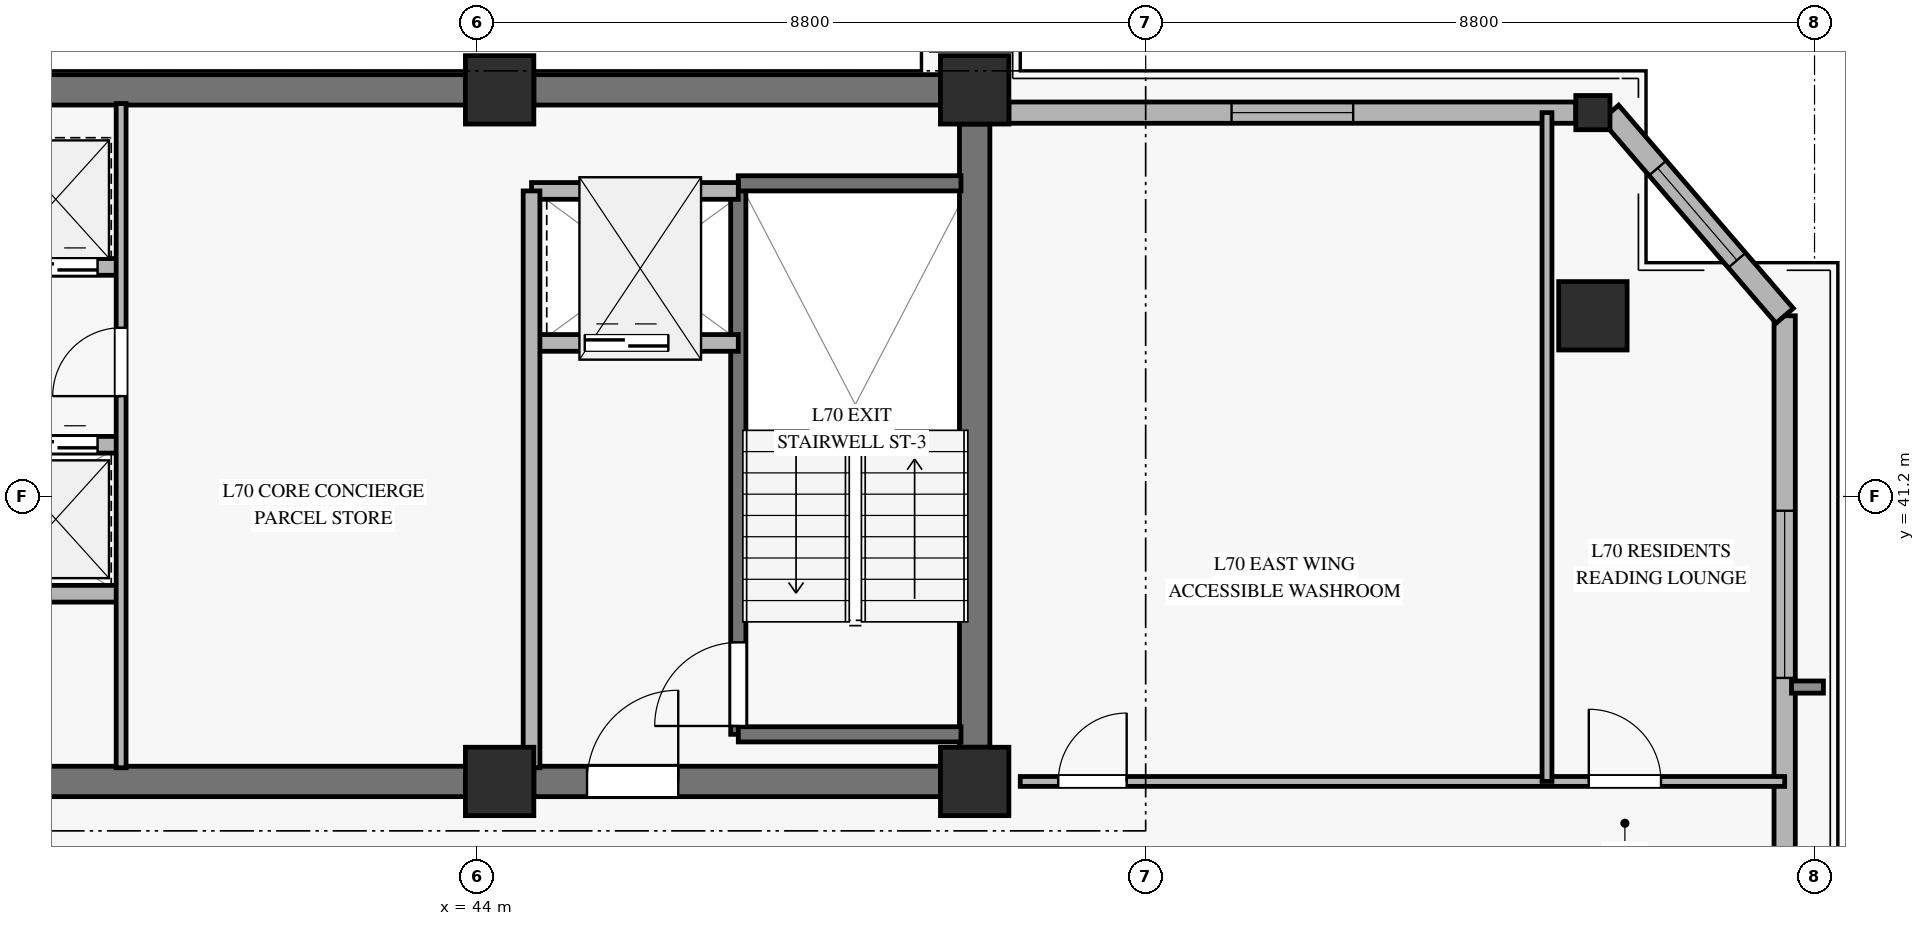
"""IFC4 building model, lengths in metres.
Left out: names, types, materials, properties, quantities, classifications, styles, units other than length and angle.
Written with IfcOpenShell. Run it as: python <this file> out.ifc"""

import sys

from ifc_helpers import new_model, si_unit, direction, frame, frame_2d, origin, origin_2d, place, context, subcontext, project, spatial, rectangle, hollow_rectangle, extrude, source, transform, mapped, element, fill, save


model = new_model("IFC4")
c1 = context("Model", 3, precision=1e-05, world=origin(), true_north=direction((0.0, 1.0)))
c2 = subcontext(c1, "Body", "Model", "MODEL_VIEW")
j1 = project(units=[si_unit("LENGTHUNIT", "METRE"), si_unit("PLANEANGLEUNIT", "RADIAN")], contexts=[c1])
p1 = place(None, origin())
s1 = spatial("IfcSite", under=j1, at=p1, CompositionType="ELEMENT")
p2 = place(p1, origin())
s2 = spatial("IfcBuilding", under=s1, at=p2, CompositionType="ELEMENT")
p3 = place(p2, frame((0.0, 0.0, 272.3)))
s3 = spatial("IfcBuildingStorey", under=s2, at=p3, CompositionType="ELEMENT", Elevation=272.3)
m1 = source(origin(), c2, "Body", "SweptSolid", [
    extrude(rectangle(XDim=0.9, YDim=0.9, at=origin_2d()), origin(), (0.0, 0.0, 1.0), 3.185),
])
for number, where, z_axis, x_axis in (
    (1, (44.3, 37.45, 0.0), (0.0, 0.0, 1.0), (1.0, 0.0, 0.0)),
    (2, (44.3, 46.55, 0.0), (0.0, 0.0, 1.0), (1.0, 0.0, 0.0)),
    (3, (50.55, 37.45, 0.0), (0.0, 0.0, 1.0), (1.0, 0.0, 0.0)),
    (4, (50.55, 46.55, 0.0), (0.0, 0.0, 1.0), (1.0, 0.0, 0.0)),
):
    element("IfcColumn", number, at=place(p3, frame(where, z_axis=z_axis, x_axis=x_axis)), inside=s3, PredefinedType="PILASTER", context=c2, shape_type="MappedRepresentation", body=[
        mapped(m1, transform((0.0, 0.0, 0.0), x_axis=(1.0, 0.0, 0.0), y_axis=(0.0, 1.0, 0.0), z_axis=(0.0, 0.0, 1.0), scale=1.0)),
    ])
p4 = place(p3, frame((36.05, 46.55, 0.0), z_axis=(0.0, 0.0, 1.0), x_axis=(1.0, 0.0, 0.0)))
e5 = element("IfcWall", 5, at=p4, inside=s3, PredefinedType="SHEAR", context=c2, shape_type="SweptSolid", body=[
    extrude(rectangle(XDim=7.8, YDim=0.4, at=frame_2d((3.9, 0.0))), origin(), (0.0, 0.0, 1.0), 3.185),
])
p5 = place(p3, frame((44.75, 46.55, 0.0), z_axis=(0.0, 0.0, 1.0), x_axis=(1.0, 0.0, 0.0)))
e6 = element("IfcWall", 6, at=p5, inside=s3, PredefinedType="SHEAR", context=c2, shape_type="SweptSolid", body=[
    extrude(rectangle(XDim=5.35, YDim=0.4, at=frame_2d((2.675, 0.0))), origin(), (0.0, 0.0, 1.0), 3.185),
])
p6 = place(p3, frame((36.05, 37.45, 0.0), z_axis=(0.0, 0.0, 1.0), x_axis=(1.0, 0.0, 0.0)))
e7 = element("IfcWall", 7, at=p6, inside=s3, PredefinedType="SHEAR", context=c2, shape_type="SweptSolid", body=[
    extrude(rectangle(XDim=7.8, YDim=0.4, at=frame_2d((3.9, 0.0))), origin(), (0.0, 0.0, 1.0), 3.185),
])
p7 = place(p3, frame((44.75, 37.45, 0.0), z_axis=(0.0, 0.0, 1.0), x_axis=(1.0, 0.0, 0.0)))
e8 = element("IfcWall", 8, at=p7, inside=s3, PredefinedType="SHEAR", context=c2, shape_type="SweptSolid", body=[
    extrude(rectangle(XDim=5.35, YDim=0.4, at=frame_2d((2.675, 0.0))), origin(), (0.0, 0.0, 1.0), 3.185),
])
p8 = place(p7, frame((0.7, 0.0, 0.0)))
e9 = element("IfcOpeningElement", 9, at=p8, cuts=e8, PredefinedType="OPENING", context=c2, shape_type="SweptSolid", body=[
    extrude(rectangle(XDim=1.2, YDim=2.15, at=frame_2d((0.6, 1.075))), frame((0.0, 0.21, 0.0), z_axis=(0.0, -1.0, 0.0), x_axis=(1.0, 0.0, 0.0)), (0.0, 0.0, 1.0), 0.42),
])
p9 = place(p3, frame((50.55, 37.9, 0.0), z_axis=(0.0, 0.0, 1.0), x_axis=(0.0, 1.0, 0.0)))
e10 = element("IfcWall", 10, at=p9, inside=s3, PredefinedType="SHEAR", context=c2, shape_type="SweptSolid", body=[
    extrude(rectangle(XDim=8.2, YDim=0.4, at=frame_2d((4.1, 0.0))), origin(), (0.0, 0.0, 1.0), 3.185),
])
m2 = source(origin(), c2, "Body", "SweptSolid", [
    extrude(hollow_rectangle(XDim=0.9, YDim=0.9, WallThickness=0.04, at=origin_2d()), origin(), (0.0, 0.0, 1.0), 3.185),
])
p10 = place(p3, frame((58.684, 43.577, 0.0), z_axis=(0.0, 0.0, 1.0), x_axis=(1.0, 0.0, 0.0)))
e11 = element("IfcColumn", 11, at=p10, inside=s3, PredefinedType="COLUMN", context=c2, shape_type="MappedRepresentation", body=[
    mapped(m2, transform((0.0, 0.0, 0.0), x_axis=(1.0, 0.0, 0.0), y_axis=(0.0, 1.0, 0.0), z_axis=(0.0, 0.0, 1.0), scale=1.0)),
])
m3 = source(origin(), c2, "Body", "SweptSolid", [
    extrude(hollow_rectangle(XDim=0.45, YDim=0.45, WallThickness=0.022, at=origin_2d()), origin(), (0.0, 0.0, 1.0), 3.185),
])
p11 = place(p3, frame((58.684, 46.25, 0.0), z_axis=(0.0, 0.0, 1.0), x_axis=(1.0, 0.0, 0.0)))
e12 = element("IfcColumn", 12, at=p11, inside=s3, PredefinedType="COLUMN", context=c2, shape_type="MappedRepresentation", body=[
    mapped(m3, transform((0.0, 0.0, 0.0), x_axis=(1.0, 0.0, 0.0), y_axis=(0.0, 1.0, 0.0), z_axis=(0.0, 0.0, 1.0), scale=1.0)),
])
p12 = place(p3, frame((61.207, 31.763, 0.0), z_axis=(0.0, 0.0, 1.0), x_axis=(0.0, 1.0, 0.0)))
e13 = element("IfcWall", 13, at=p12, inside=s3, PredefinedType="SOLIDWALL", context=c2, shape_type="SweptSolid", body=[
    extrude(rectangle(XDim=11.814, YDim=0.28, at=frame_2d((5.907, 0.0))), origin(), (0.0, 0.0, 1.0), 2.815),
])
p13 = place(p12, frame((7.049, 0.0, 0.45)))
e14 = element("IfcOpeningElement", 14, at=p13, cuts=e13, PredefinedType="OPENING", context=c2, shape_type="SweptSolid", body=[
    extrude(rectangle(XDim=2.2, YDim=2.1, at=frame_2d((1.1, 1.05))), frame((0.0, 0.15, 0.0), z_axis=(0.0, -1.0, 0.0), x_axis=(1.0, 0.0, 0.0)), (0.0, 0.0, 1.0), 0.3),
])
p14 = place(p3, frame((51.0, 46.25, 0.0), z_axis=(0.0, 0.0, 1.0), x_axis=(1.0, 0.0, 0.0)))
e15 = element("IfcWall", 15, at=p14, inside=s3, PredefinedType="SOLIDWALL", context=c2, shape_type="SweptSolid", body=[
    extrude(rectangle(XDim=7.459, YDim=0.28, at=frame_2d((3.729, 0.0))), origin(), (0.0, 0.0, 1.0), 2.815),
])
p15 = place(p14, frame((2.93, 0.0, 0.45)))
e16 = element("IfcOpeningElement", 16, at=p15, cuts=e15, PredefinedType="OPENING", context=c2, shape_type="SweptSolid", body=[
    extrude(rectangle(XDim=1.6, YDim=2.0, at=frame_2d((0.8, 1.0))), frame((0.0, 0.15, 0.0), z_axis=(0.0, -1.0, 0.0), x_axis=(1.0, 0.0, 0.0)), (0.0, 0.0, 1.0), 0.3),
])
p16 = place(p3, frame((61.207, 43.577, 0.0), z_axis=(0.0, 0.0, 1.0), x_axis=(-0.651914250567, 0.758292694089, 0.0)))
e17 = element("IfcWall", 17, at=p16, inside=s3, PredefinedType="SOLIDWALL", context=c2, shape_type="SweptSolid", body=[
    extrude(rectangle(XDim=3.525, YDim=0.3, at=frame_2d((1.763, 0.0))), origin(), (0.0, 0.0, 1.0), 2.815),
])
p17 = place(p16, frame((0.963, 0.0, 0.45)))
e18 = element("IfcOpeningElement", 18, at=p17, cuts=e17, PredefinedType="OPENING", context=c2, shape_type="SweptSolid", body=[
    extrude(rectangle(XDim=1.6, YDim=2.0, at=frame_2d((0.8, 1.0))), frame((0.0, 0.16, 0.0), z_axis=(0.0, -1.0, 0.0), x_axis=(1.0, 0.0, 0.0)), (0.0, 0.0, 1.0), 0.32),
])
p18 = place(p3, frame((47.44, 38.07, 0.0), z_axis=(0.0, 0.0, 1.0), x_axis=(0.0, 1.0, 0.0)))
e19 = element("IfcWall", 19, at=p18, inside=s3, PredefinedType="SOLIDWALL", context=c2, shape_type="SweptSolid", body=[
    extrude(rectangle(XDim=7.25, YDim=0.2, at=frame_2d((3.625, 0.0))), origin(), (0.0, 0.0, 1.0), 3.4),
])
p19 = place(p18, frame((0.11, 0.0, 0.0)))
e20 = element("IfcOpeningElement", 20, at=p19, cuts=e19, PredefinedType="OPENING", context=c2, shape_type="SweptSolid", body=[
    extrude(rectangle(XDim=1.1, YDim=2.15, at=frame_2d((0.55, 1.075))), frame((0.0, 0.11, 0.0), z_axis=(0.0, -1.0, 0.0), x_axis=(1.0, 0.0, 0.0)), (0.0, 0.0, 1.0), 0.22),
])
for number, where, z_axis, x_axis in (
    (21, (47.44, 45.32, 0.0), (0.0, 0.0, 1.0), (1.0, 0.0, 0.0)),
    (22, (47.44, 38.07, 0.0), (0.0, 0.0, 1.0), (1.0, 0.0, 0.0)),
):
    element("IfcWall", number, at=place(p3, frame(where, z_axis=z_axis, x_axis=x_axis)), inside=s3, PredefinedType="SOLIDWALL", context=c2, shape_type="SweptSolid", body=[
        extrude(rectangle(XDim=2.93, YDim=0.2, at=frame_2d((1.465, 0.0))), origin(), (0.0, 0.0, 1.0), 3.4),
    ])
p20 = place(p3, frame((44.72, 43.22, 0.0), z_axis=(0.0, 0.0, 1.0), x_axis=(1.0, 0.0, 0.0)))
e23 = element("IfcWall", 23, at=p20, inside=s3, PredefinedType="SOLIDWALL", context=c2, shape_type="SweptSolid", body=[
    extrude(rectangle(XDim=2.72, YDim=0.22, at=frame_2d((1.36, 0.0))), origin(), (0.0, 0.0, 1.0), 3.185),
])
p21 = place(p20, frame((0.7, 0.0, 0.0)))
e24 = element("IfcOpeningElement", 24, at=p21, cuts=e23, PredefinedType="OPENING", context=c2, shape_type="SweptSolid", body=[
    extrude(rectangle(XDim=1.1, YDim=2.2, at=frame_2d((0.55, 1.1))), frame((0.0, 0.12, 0.0), z_axis=(0.0, -1.0, 0.0), x_axis=(1.0, 0.0, 0.0)), (0.0, 0.0, 1.0), 0.24),
])
p22 = place(p3, frame((44.72, 45.22, 0.0), z_axis=(0.0, 0.0, 1.0), x_axis=(1.0, 0.0, 0.0)))
e25 = element("IfcWall", 25, at=p22, inside=s3, PredefinedType="SOLIDWALL", context=c2, shape_type="SweptSolid", body=[
    extrude(rectangle(XDim=2.72, YDim=0.22, at=frame_2d((1.36, 0.0))), origin(), (0.0, 0.0, 1.0), 3.185),
])
p23 = place(p3, frame((44.72, 37.63, 0.0), z_axis=(0.0, 0.0, 1.0), x_axis=(0.0, 1.0, 0.0)))
e26 = element("IfcWall", 26, at=p23, inside=s3, PredefinedType="SOLIDWALL", context=c2, shape_type="SweptSolid", body=[
    extrude(rectangle(XDim=7.59, YDim=0.22, at=frame_2d((3.795, 0.0))), origin(), (0.0, 0.0, 1.0), 3.185),
])
p24 = place(p3, frame((36.12, 44.22, 0.0), z_axis=(0.0, 0.0, 1.0), x_axis=(1.0, 0.0, 0.0)))
e27 = element("IfcWall", 27, at=p24, inside=s3, PredefinedType="SOLIDWALL", context=c2, shape_type="SweptSolid", body=[
    extrude(rectangle(XDim=3.2, YDim=0.22, at=frame_2d((1.6, 0.0))), origin(), (0.0, 0.0, 1.0), 3.185),
])
p25 = place(p24, frame((0.3, 0.0, 0.0)))
e28 = element("IfcOpeningElement", 28, at=p25, cuts=e27, PredefinedType="OPENING", context=c2, shape_type="SweptSolid", body=[
    extrude(rectangle(XDim=1.1, YDim=2.2, at=frame_2d((0.55, 1.1))), frame((0.0, 0.12, 0.0), z_axis=(0.0, -1.0, 0.0), x_axis=(1.0, 0.0, 0.0)), (0.0, 0.0, 1.0), 0.24),
])
p26 = place(p24, frame((1.79, 0.0, 0.0)))
e29 = element("IfcOpeningElement", 29, at=p26, cuts=e27, PredefinedType="OPENING", context=c2, shape_type="SweptSolid", body=[
    extrude(rectangle(XDim=1.1, YDim=2.2, at=frame_2d((0.55, 1.1))), frame((0.0, 0.12, 0.0), z_axis=(0.0, -1.0, 0.0), x_axis=(1.0, 0.0, 0.0)), (0.0, 0.0, 1.0), 0.24),
])
p27 = place(p3, frame((36.12, 41.88, 0.0), z_axis=(0.0, 0.0, 1.0), x_axis=(1.0, 0.0, 0.0)))
e30 = element("IfcWall", 30, at=p27, inside=s3, PredefinedType="SOLIDWALL", context=c2, shape_type="SweptSolid", body=[
    extrude(rectangle(XDim=3.2, YDim=0.22, at=frame_2d((1.6, 0.0))), origin(), (0.0, 0.0, 1.0), 3.185),
])
p28 = place(p27, frame((0.3, 0.0, 0.0)))
e31 = element("IfcOpeningElement", 31, at=p28, cuts=e30, PredefinedType="OPENING", context=c2, shape_type="SweptSolid", body=[
    extrude(rectangle(XDim=1.1, YDim=2.2, at=frame_2d((0.55, 1.1))), frame((0.0, 0.12, 0.0), z_axis=(0.0, -1.0, 0.0), x_axis=(1.0, 0.0, 0.0)), (0.0, 0.0, 1.0), 0.24),
])
p29 = place(p27, frame((1.79, 0.0, 0.0)))
e32 = element("IfcOpeningElement", 32, at=p29, cuts=e30, PredefinedType="OPENING", context=c2, shape_type="SweptSolid", body=[
    extrude(rectangle(XDim=1.1, YDim=2.2, at=frame_2d((0.55, 1.1))), frame((0.0, 0.12, 0.0), z_axis=(0.0, -1.0, 0.0), x_axis=(1.0, 0.0, 0.0)), (0.0, 0.0, 1.0), 0.24),
])
p30 = place(p3, frame((36.12, 39.92, 0.0), z_axis=(0.0, 0.0, 1.0), x_axis=(1.0, 0.0, 0.0)))
e33 = element("IfcWall", 33, at=p30, inside=s3, PredefinedType="SOLIDWALL", context=c2, shape_type="SweptSolid", body=[
    extrude(rectangle(XDim=3.2, YDim=0.22, at=frame_2d((1.6, 0.0))), origin(), (0.0, 0.0, 1.0), 3.185),
])
p31 = place(p3, frame((39.32, 37.63, 0.0), z_axis=(0.0, 0.0, 1.0), x_axis=(0.0, 1.0, 0.0)))
e34 = element("IfcWall", 34, at=p31, inside=s3, PredefinedType="PARTITIONING", context=c2, shape_type="SweptSolid", body=[
    extrude(rectangle(XDim=8.74, YDim=0.13, at=frame_2d((4.37, 0.0))), origin(), (0.0, 0.0, 1.0), 3.185),
])
p32 = place(p31, frame((4.89, 0.0, 0.0)))
e35 = element("IfcOpeningElement", 35, at=p32, cuts=e34, PredefinedType="OPENING", context=c2, shape_type="SweptSolid", body=[
    extrude(rectangle(XDim=0.9, YDim=2.1, at=frame_2d((0.45, 1.05))), frame((0.0, 0.075, 0.0), z_axis=(0.0, -1.0, 0.0), x_axis=(1.0, 0.0, 0.0)), (0.0, 0.0, 1.0), 0.15),
])
p33 = place(p3, frame((51.15, 37.45, 0.0), z_axis=(0.0, 0.0, 1.0), x_axis=(1.0, 0.0, 0.0)))
e36 = element("IfcWall", 36, at=p33, inside=s3, PredefinedType="PARTITIONING", context=c2, shape_type="SweptSolid", body=[
    extrude(rectangle(XDim=10.057, YDim=0.13, at=frame_2d((5.029, 0.0))), origin(), (0.0, 0.0, 1.0), 2.82),
])
p34 = place(p33, frame((0.5, 0.0, 0.0)))
e37 = element("IfcOpeningElement", 37, at=p34, cuts=e36, PredefinedType="OPENING", context=c2, shape_type="SweptSolid", body=[
    extrude(rectangle(XDim=0.9, YDim=2.1, at=frame_2d((0.45, 1.05))), frame((0.0, 0.075, 0.0), z_axis=(0.0, -1.0, 0.0), x_axis=(1.0, 0.0, 0.0)), (0.0, 0.0, 1.0), 0.15),
])
p35 = place(p33, frame((7.48, 0.0, 0.0)))
e38 = element("IfcOpeningElement", 38, at=p35, cuts=e36, PredefinedType="OPENING", context=c2, shape_type="SweptSolid", body=[
    extrude(rectangle(XDim=0.95, YDim=2.1, at=frame_2d((0.475, 1.05))), frame((0.0, 0.075, 0.0), z_axis=(0.0, -1.0, 0.0), x_axis=(1.0, 0.0, 0.0)), (0.0, 0.0, 1.0), 0.15),
])
p36 = place(p3, frame((58.08, 37.45, 0.0), z_axis=(0.0, 0.0, 1.0), x_axis=(0.0, 1.0, 0.0)))
e39 = element("IfcWall", 39, at=p36, inside=s3, PredefinedType="PARTITIONING", context=c2, shape_type="SweptSolid", body=[
    extrude(rectangle(XDim=8.8, YDim=0.13, at=frame_2d((4.4, 0.0))), origin(), (0.0, 0.0, 1.0), 3.185),
])
m4 = source(origin(), c2, "Body", "SweptSolid", [
    extrude(rectangle(XDim=2.2, YDim=2.1, at=frame_2d((1.1, 1.05))), frame((0.0, 0.03, 0.0), z_axis=(0.0, -1.0, 0.0), x_axis=(1.0, 0.0, 0.0)), (0.0, 0.0, 1.0), 0.06),
])
p37 = place(p13, origin())
e40 = element("IfcWindow", 40, at=p37, inside=s3, PartitioningType="SINGLE_PANEL", PredefinedType="WINDOW", context=c2, shape_type="MappedRepresentation", body=[
    mapped(m4, transform((0.0, 0.0, 0.0), x_axis=(1.0, 0.0, 0.0), y_axis=(0.0, 1.0, 0.0), z_axis=(0.0, 0.0, 1.0), scale=1.0)),
])
fill(e14, e40)
m5 = source(origin(), c2, "Body", "SweptSolid", [
    extrude(rectangle(XDim=1.6, YDim=2.0, at=frame_2d((0.8, 1.0))), frame((0.0, 0.03, 0.0), z_axis=(0.0, -1.0, 0.0), x_axis=(1.0, 0.0, 0.0)), (0.0, 0.0, 1.0), 0.06),
])
p38 = place(p15, origin())
e41 = element("IfcWindow", 41, at=p38, inside=s3, PartitioningType="SINGLE_PANEL", PredefinedType="WINDOW", context=c2, shape_type="MappedRepresentation", body=[
    mapped(m5, transform((0.0, 0.0, 0.0), x_axis=(1.0, 0.0, 0.0), y_axis=(0.0, 1.0, 0.0), z_axis=(0.0, 0.0, 1.0), scale=1.0)),
])
fill(e16, e41)
p39 = place(p17, origin())
e42 = element("IfcWindow", 42, at=p39, inside=s3, PartitioningType="SINGLE_PANEL", PredefinedType="WINDOW", context=c2, shape_type="MappedRepresentation", body=[
    mapped(m5, transform((0.0, 0.0, 0.0), x_axis=(1.0, 0.0, 0.0), y_axis=(0.0, 1.0, 0.0), z_axis=(0.0, 0.0, 1.0), scale=1.0)),
])
fill(e18, e42)
m6 = source(origin(), c2, "Body", "SweptSolid", [
    extrude(rectangle(XDim=1.1, YDim=2.15, at=frame_2d((0.55, 1.075))), frame((0.0, 0.025, 0.0), z_axis=(0.0, -1.0, 0.0), x_axis=(1.0, 0.0, 0.0)), (0.0, 0.0, 1.0), 0.05),
])
p40 = place(p19, origin())
e43 = element("IfcDoor", 43, at=p40, inside=s3, OperationType="SINGLE_SWING_LEFT", PredefinedType="DOOR", context=c2, shape_type="MappedRepresentation", body=[
    mapped(m6, transform((0.0, 0.0, 0.0), x_axis=(1.0, 0.0, 0.0), y_axis=(0.0, 1.0, 0.0), z_axis=(0.0, 0.0, 1.0), scale=1.0)),
])
fill(e20, e43)
m7 = source(origin(), c2, "Body", "SweptSolid", [
    extrude(rectangle(XDim=1.1, YDim=2.2, at=frame_2d((0.55, 1.1))), frame((0.0, 0.025, 0.0), z_axis=(0.0, -1.0, 0.0), x_axis=(1.0, 0.0, 0.0)), (0.0, 0.0, 1.0), 0.05),
])
p41 = place(p21, origin())
e44 = element("IfcDoor", 44, at=p41, inside=s3, OperationType="SLIDING_TO_LEFT", PredefinedType="DOOR", context=c2, shape_type="MappedRepresentation", body=[
    mapped(m7, transform((0.0, 0.0, 0.0), x_axis=(1.0, 0.0, 0.0), y_axis=(0.0, 1.0, 0.0), z_axis=(0.0, 0.0, 1.0), scale=1.0)),
])
fill(e24, e44)
m8 = source(origin(), c2, "Body", "SweptSolid", [
    extrude(rectangle(XDim=1.2, YDim=2.15, at=frame_2d((0.6, 1.075))), frame((0.0, 0.025, 0.0), z_axis=(0.0, -1.0, 0.0), x_axis=(1.0, 0.0, 0.0)), (0.0, 0.0, 1.0), 0.05),
])
p42 = place(p8, origin())
e45 = element("IfcDoor", 45, at=p42, inside=s3, OperationType="SINGLE_SWING_RIGHT", PredefinedType="DOOR", context=c2, shape_type="MappedRepresentation", body=[
    mapped(m8, transform((0.0, 0.0, 0.0), x_axis=(1.0, 0.0, 0.0), y_axis=(0.0, 1.0, 0.0), z_axis=(0.0, 0.0, 1.0), scale=1.0)),
])
fill(e9, e45)
p43 = place(p26, origin())
e46 = element("IfcDoor", 46, at=p43, inside=s3, OperationType="SLIDING_TO_LEFT", PredefinedType="DOOR", context=c2, shape_type="MappedRepresentation", body=[
    mapped(m7, transform((0.0, 0.0, 0.0), x_axis=(1.0, 0.0, 0.0), y_axis=(0.0, 1.0, 0.0), z_axis=(0.0, 0.0, 1.0), scale=1.0)),
])
fill(e29, e46)
p44 = place(p29, origin())
e47 = element("IfcDoor", 47, at=p44, inside=s3, OperationType="SLIDING_TO_LEFT", PredefinedType="DOOR", context=c2, shape_type="MappedRepresentation", body=[
    mapped(m7, transform((0.0, 0.0, 0.0), x_axis=(1.0, 0.0, 0.0), y_axis=(0.0, 1.0, 0.0), z_axis=(0.0, 0.0, 1.0), scale=1.0)),
])
fill(e32, e47)
m9 = source(origin(), c2, "Body", "SweptSolid", [
    extrude(rectangle(XDim=0.9, YDim=2.1, at=frame_2d((0.45, 1.05))), frame((0.0, 0.025, 0.0), z_axis=(0.0, -1.0, 0.0), x_axis=(1.0, 0.0, 0.0)), (0.0, 0.0, 1.0), 0.05),
])
p45 = place(p32, origin())
e48 = element("IfcDoor", 48, at=p45, inside=s3, OperationType="SINGLE_SWING_LEFT", PredefinedType="DOOR", context=c2, shape_type="MappedRepresentation", body=[
    mapped(m9, transform((0.0, 0.0, 0.0), x_axis=(1.0, 0.0, 0.0), y_axis=(0.0, 1.0, 0.0), z_axis=(0.0, 0.0, 1.0), scale=1.0)),
])
fill(e35, e48)
p46 = place(p34, origin())
e49 = element("IfcDoor", 49, at=p46, inside=s3, OperationType="SINGLE_SWING_RIGHT", PredefinedType="DOOR", context=c2, shape_type="MappedRepresentation", body=[
    mapped(m9, transform((0.0, 0.0, 0.0), x_axis=(1.0, 0.0, 0.0), y_axis=(0.0, 1.0, 0.0), z_axis=(0.0, 0.0, 1.0), scale=1.0)),
])
fill(e37, e49)
m10 = source(origin(), c2, "Body", "SweptSolid", [
    extrude(rectangle(XDim=0.95, YDim=2.1, at=frame_2d((0.475, 1.05))), frame((0.0, 0.025, 0.0), z_axis=(0.0, -1.0, 0.0), x_axis=(1.0, 0.0, 0.0)), (0.0, 0.0, 1.0), 0.05),
])
p47 = place(p35, origin())
e50 = element("IfcDoor", 50, at=p47, inside=s3, OperationType="SINGLE_SWING_LEFT", PredefinedType="DOOR", context=c2, shape_type="MappedRepresentation", body=[
    mapped(m10, transform((0.0, 0.0, 0.0), x_axis=(1.0, 0.0, 0.0), y_axis=(0.0, 1.0, 0.0), z_axis=(0.0, 0.0, 1.0), scale=1.0)),
])
fill(e38, e50)
save(model, sys.argv[1])
